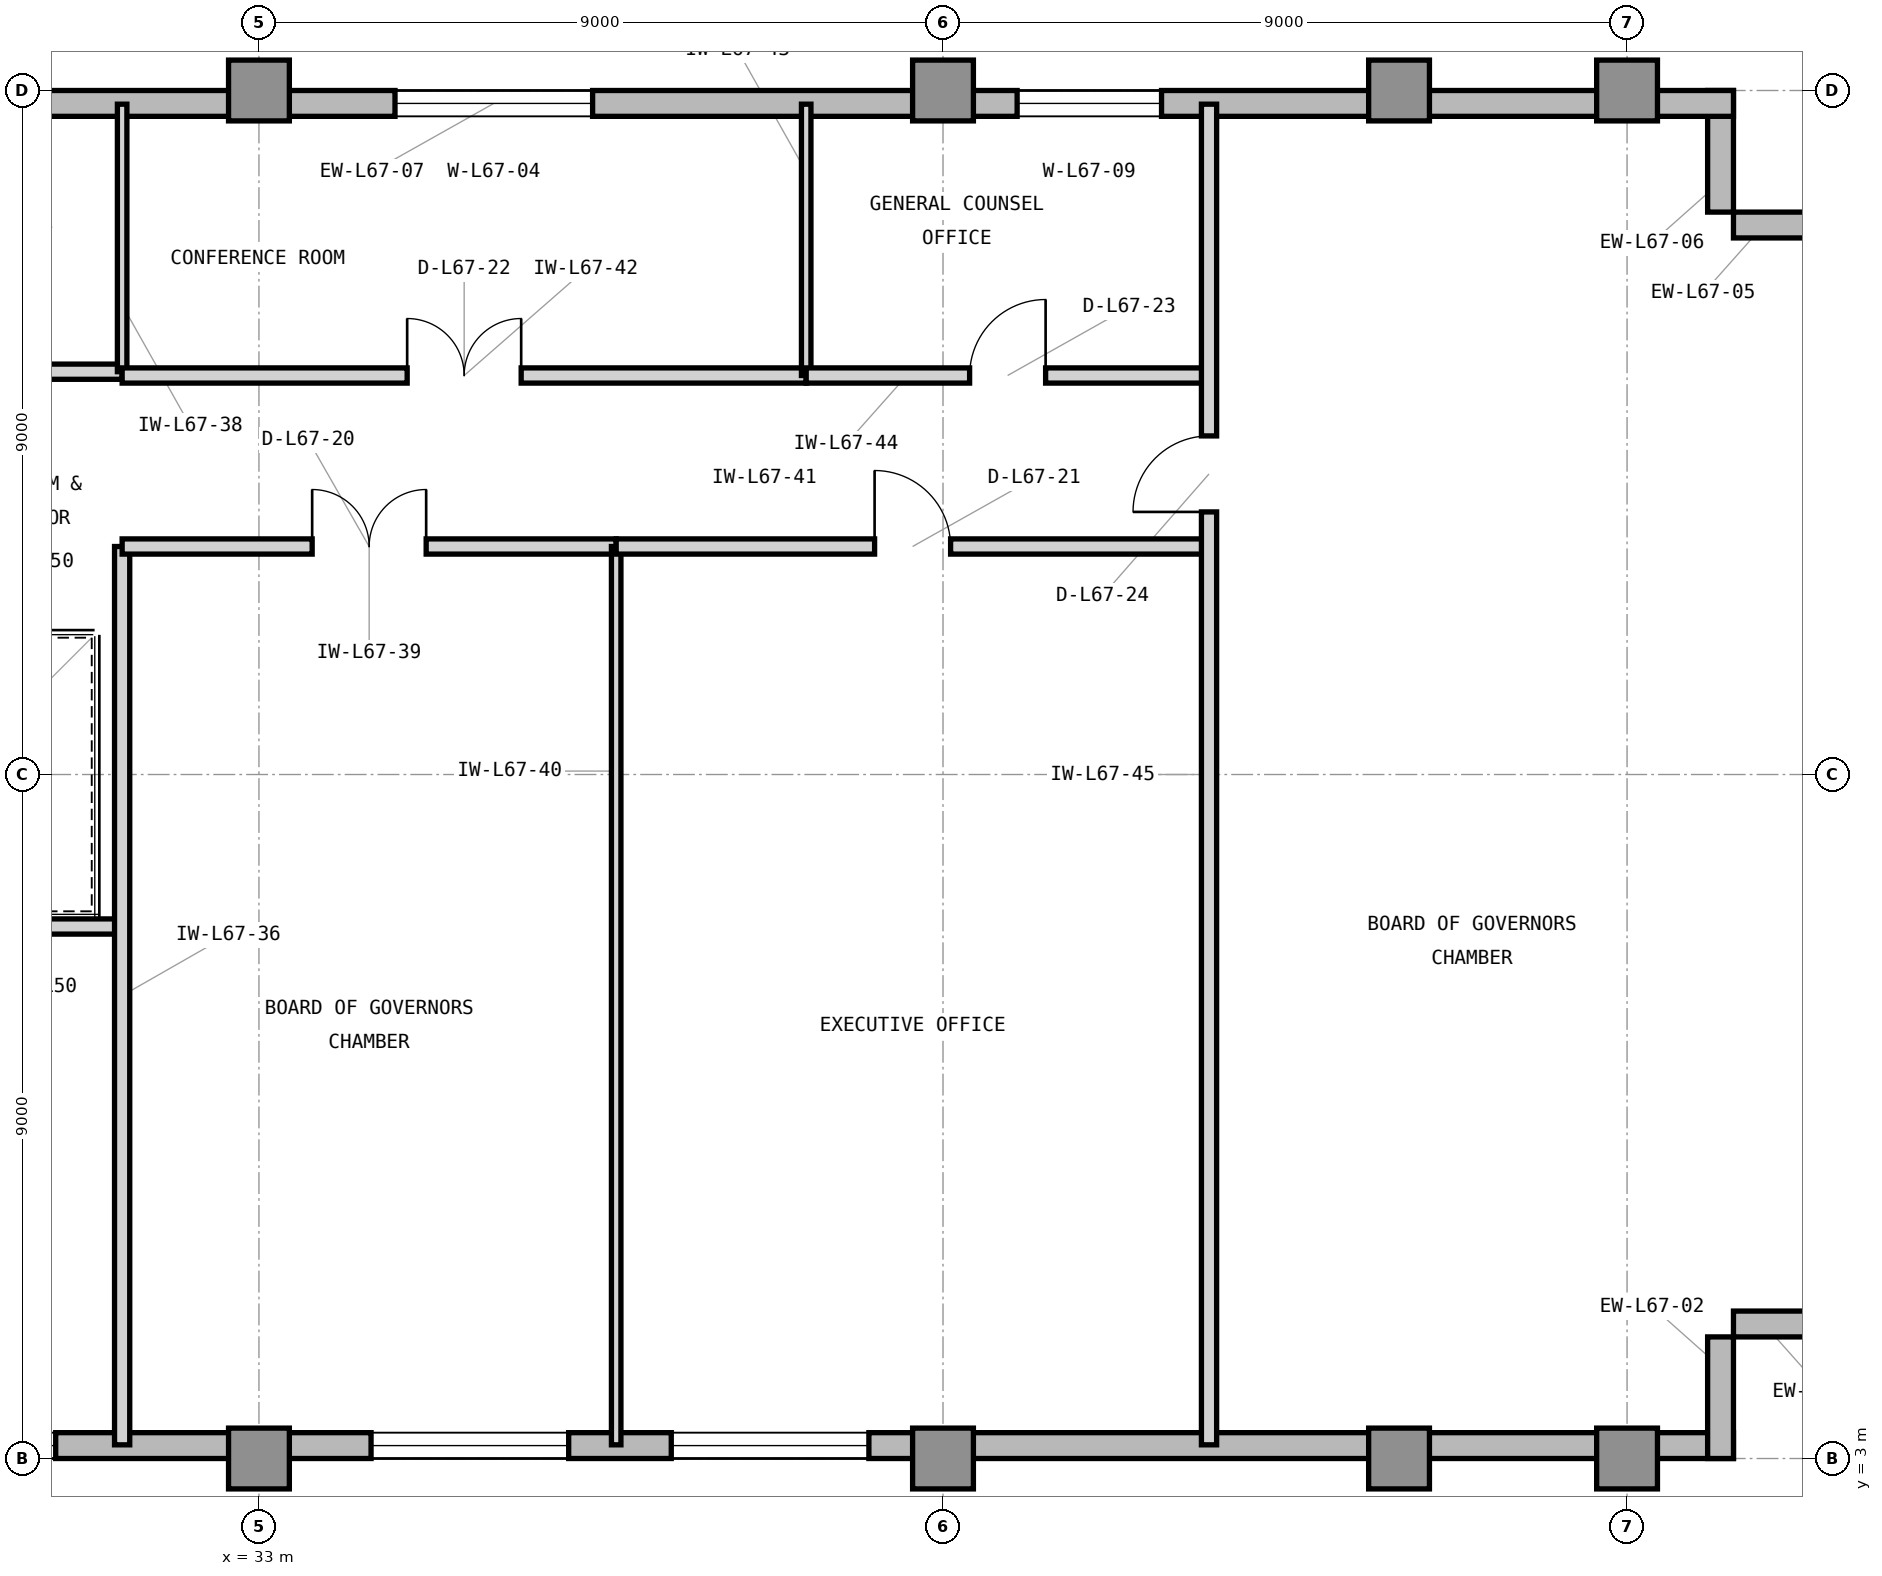
"""IFC4 building model, lengths in metres.
Left out: names, types, materials, properties, quantities, classifications, styles, units other than length and angle.
Written with IfcOpenShell. Run it as: python <this file> out.ifc"""

import sys

from ifc_helpers import new_model, si_unit, direction, frame, frame_2d, origin, origin_2d, place, context, subcontext, project, spatial, rectangle, extrude, element, fill, save


model = new_model("IFC4")
c1 = context("Model", 3, precision=1e-05, world=origin(), true_north=direction((0.0, 1.0)))
c2 = subcontext(c1, "Body", "Model", "MODEL_VIEW")
j1 = project(units=[si_unit("LENGTHUNIT", "METRE"), si_unit("PLANEANGLEUNIT", "RADIAN")], contexts=[c1])
p1 = place(None, origin())
s1 = spatial("IfcSite", under=j1, at=p1, CompositionType="ELEMENT")
p2 = place(p1, origin())
s2 = spatial("IfcBuilding", under=s1, at=p2, CompositionType="ELEMENT")
p3 = place(p2, frame((0.0, 0.0, 274.2)))
s3 = spatial("IfcBuildingStorey", under=s2, at=p3, CompositionType="ELEMENT", Elevation=274.2)
for number, where, z_axis, x_axis in (
    (1, (33.0, 3.0, 0.0), (0.0, 0.0, 1.0), (1.0, 0.0, 0.0)),
    (2, (33.0, 21.0, 0.0), (0.0, 0.0, 1.0), (1.0, 0.0, 0.0)),
    (3, (42.0, 3.0, 0.0), (0.0, 0.0, 1.0), (1.0, 0.0, 0.0)),
    (4, (42.0, 21.0, 0.0), (0.0, 0.0, 1.0), (1.0, 0.0, 0.0)),
    (5, (48.0, 3.0, 0.0), (0.0, 0.0, 1.0), (1.0, 0.0, 0.0)),
    (6, (48.0, 21.0, 0.0), (0.0, 0.0, 1.0), (1.0, 0.0, 0.0)),
    (7, (51.0, 3.0, 0.0), (0.0, 0.0, 1.0), (1.0, 0.0, 0.0)),
    (8, (51.0, 21.0, 0.0), (0.0, 0.0, 1.0), (1.0, 0.0, 0.0)),
):
    element("IfcColumn", number, at=place(p3, frame(where, z_axis=z_axis, x_axis=x_axis)), inside=s3, PredefinedType="COLUMN", context=c2, shape_type="SweptSolid", body=[
        extrude(rectangle(XDim=0.8, YDim=0.8, at=origin_2d()), origin(), (0.0, 0.0, 1.0), 3.9),
    ])
p4 = place(p3, frame((23.9, 3.17, 0.0), z_axis=(0.0, 0.0, 1.0), x_axis=(1.0, 0.0, 0.0)))
e9 = element("IfcWall", 9, at=p4, inside=s3, PredefinedType="STANDARD", context=c2, shape_type="SweptSolid", body=[
    extrude(rectangle(XDim=28.5, YDim=0.34, at=frame_2d((14.25, 0.0))), origin(), (0.0, 0.0, 1.0), 3.715),
])
p5 = place(p4, frame((10.575, 0.0, 0.8)))
e10 = element("IfcOpeningElement", 10, at=p5, cuts=e9, PredefinedType="OPENING", context=c2, shape_type="SweptSolid", body=[
    extrude(rectangle(XDim=2.6, YDim=2.35, at=frame_2d((1.3, 1.175))), frame((0.0, 0.18, 0.0), z_axis=(0.0, -1.0, 0.0), x_axis=(1.0, 0.0, 0.0)), (0.0, 0.0, 1.0), 0.36),
])
p6 = place(p4, frame((1.1, 0.0, 0.8)))
e11 = element("IfcOpeningElement", 11, at=p6, cuts=e9, PredefinedType="OPENING", context=c2, shape_type="SweptSolid", body=[
    extrude(rectangle(XDim=1.2, YDim=2.35, at=frame_2d((0.6, 1.175))), frame((0.0, 0.18, 0.0), z_axis=(0.0, -1.0, 0.0), x_axis=(1.0, 0.0, 0.0)), (0.0, 0.0, 1.0), 0.36),
])
p7 = place(p4, frame((3.826, 0.0, 0.8)))
e12 = element("IfcOpeningElement", 12, at=p7, cuts=e9, PredefinedType="OPENING", context=c2, shape_type="SweptSolid", body=[
    extrude(rectangle(XDim=2.6, YDim=2.35, at=frame_2d((1.3, 1.175))), frame((0.0, 0.18, 0.0), z_axis=(0.0, -1.0, 0.0), x_axis=(1.0, 0.0, 0.0)), (0.0, 0.0, 1.0), 0.36),
])
p8 = place(p4, frame((14.525, 0.0, 0.8)))
e13 = element("IfcOpeningElement", 13, at=p8, cuts=e9, PredefinedType="OPENING", context=c2, shape_type="SweptSolid", body=[
    extrude(rectangle(XDim=2.6, YDim=2.35, at=frame_2d((1.3, 1.175))), frame((0.0, 0.18, 0.0), z_axis=(0.0, -1.0, 0.0), x_axis=(1.0, 0.0, 0.0)), (0.0, 0.0, 1.0), 0.36),
])
for number, where, z_axis, x_axis in (
    (14, (52.23, 3.0, 0.0), (0.0, 0.0, 1.0), (0.0, 1.0, 0.0)),
    (15, (52.4, 4.77, 0.0), (0.0, 0.0, 1.0), (1.0, 0.0, 0.0)),
    (16, (54.0, 19.23, 0.0), (0.0, 0.0, 1.0), (-1.0, 0.0, 0.0)),
    (17, (52.23, 19.4, 0.0), (0.0, 0.0, 1.0), (0.0, 1.0, 0.0)),
):
    element("IfcWall", number, at=place(p3, frame(where, z_axis=z_axis, x_axis=x_axis)), inside=s3, PredefinedType="STANDARD", context=c2, shape_type="SweptSolid", body=[
        extrude(rectangle(XDim=1.6, YDim=0.34, at=frame_2d((0.8, 0.0))), origin(), (0.0, 0.0, 1.0), 3.715),
    ])
p9 = place(p3, frame((52.4, 20.83, 0.0), z_axis=(0.0, 0.0, 1.0), x_axis=(-1.0, 0.0, 0.0)))
e18 = element("IfcWall", 18, at=p9, inside=s3, PredefinedType="STANDARD", context=c2, shape_type="SweptSolid", body=[
    extrude(rectangle(XDim=32.62, YDim=0.34, at=frame_2d((16.31, 0.0))), origin(), (0.0, 0.0, 1.0), 3.715),
])
p10 = place(p9, frame((15.01, 0.0, 0.8)))
e19 = element("IfcOpeningElement", 19, at=p10, cuts=e18, PredefinedType="OPENING", context=c2, shape_type="SweptSolid", body=[
    extrude(rectangle(XDim=2.6, YDim=2.35, at=frame_2d((1.3, 1.175))), frame((0.0, 0.18, 0.0), z_axis=(0.0, -1.0, 0.0), x_axis=(1.0, 0.0, 0.0)), (0.0, 0.0, 1.0), 0.36),
])
p11 = place(p9, frame((24.33, 0.0, 0.8)))
e20 = element("IfcOpeningElement", 20, at=p11, cuts=e18, PredefinedType="OPENING", context=c2, shape_type="SweptSolid", body=[
    extrude(rectangle(XDim=2.6, YDim=2.35, at=frame_2d((1.3, 1.175))), frame((0.0, 0.18, 0.0), z_axis=(0.0, -1.0, 0.0), x_axis=(1.0, 0.0, 0.0)), (0.0, 0.0, 1.0), 0.36),
])
p12 = place(p9, frame((7.525, 0.0, 0.8)))
e21 = element("IfcOpeningElement", 21, at=p12, cuts=e18, PredefinedType="OPENING", context=c2, shape_type="SweptSolid", body=[
    extrude(rectangle(XDim=1.9, YDim=2.35, at=frame_2d((0.95, 1.175))), frame((0.0, 0.18, 0.0), z_axis=(0.0, -1.0, 0.0), x_axis=(1.0, 0.0, 0.0)), (0.0, 0.0, 1.0), 0.36),
])
p13 = place(p3, frame((26.9, 10.0, 0.0), z_axis=(0.0, 0.0, 1.0), x_axis=(1.0, 0.0, 0.0)))
e22 = element("IfcWall", 22, at=p13, inside=s3, PredefinedType="PARTITIONING", context=c2, shape_type="SweptSolid", body=[
    extrude(rectangle(XDim=4.3, YDim=0.2, at=frame_2d((2.15, 0.0))), origin(), (0.0, 0.0, 1.0), 3.705),
])
p14 = place(p3, frame((31.2, 3.18, 0.0), z_axis=(0.0, 0.0, 1.0), x_axis=(0.0, 1.0, 0.0)))
e23 = element("IfcWall", 23, at=p14, inside=s3, PredefinedType="PARTITIONING", context=c2, shape_type="SweptSolid", body=[
    extrude(rectangle(XDim=11.82, YDim=0.2, at=frame_2d((5.91, 0.0))), origin(), (0.0, 0.0, 1.0), 3.705),
])
p15 = place(p3, frame((23.85, 17.3, 0.0), z_axis=(0.0, 0.0, 1.0), x_axis=(1.0, 0.0, 0.0)))
e24 = element("IfcWall", 24, at=p15, inside=s3, PredefinedType="PARTITIONING", context=c2, shape_type="SweptSolid", body=[
    extrude(rectangle(XDim=7.35, YDim=0.2, at=frame_2d((3.675, 0.0))), origin(), (0.0, 0.0, 1.0), 3.705),
])
p16 = place(p15, frame((2.8, 0.0, 0.0)))
e25 = element("IfcOpeningElement", 25, at=p16, cuts=e24, PredefinedType="OPENING", context=c2, shape_type="SweptSolid", body=[
    extrude(rectangle(XDim=1.0, YDim=2.15, at=frame_2d((0.5, 1.075))), frame((0.0, 0.11, 0.0), z_axis=(0.0, -1.0, 0.0), x_axis=(1.0, 0.0, 0.0)), (0.0, 0.0, 1.0), 0.22),
])
p17 = place(p3, frame((31.2, 17.3, 0.0), z_axis=(0.0, 0.0, 1.0), x_axis=(0.0, 1.0, 0.0)))
e26 = element("IfcWall", 26, at=p17, inside=s3, PredefinedType="PARTITIONING", context=c2, shape_type="SweptSolid", body=[
    extrude(rectangle(XDim=3.52, YDim=0.125, at=frame_2d((1.76, 0.0))), origin(), (0.0, 0.0, 1.0), 3.705),
])
p18 = place(p3, frame((31.2, 15.0, 0.0), z_axis=(0.0, 0.0, 1.0), x_axis=(1.0, 0.0, 0.0)))
e27 = element("IfcWall", 27, at=p18, inside=s3, PredefinedType="PARTITIONING", context=c2, shape_type="SweptSolid", body=[
    extrude(rectangle(XDim=6.5, YDim=0.2, at=frame_2d((3.25, 0.0))), origin(), (0.0, 0.0, 1.0), 3.301),
])
p19 = place(p18, frame((2.5, 0.0, 0.0)))
e28 = element("IfcOpeningElement", 28, at=p19, cuts=e27, PredefinedType="OPENING", context=c2, shape_type="SweptSolid", body=[
    extrude(rectangle(XDim=1.5, YDim=2.3, at=frame_2d((0.75, 1.15))), frame((0.0, 0.11, 0.0), z_axis=(0.0, -1.0, 0.0), x_axis=(1.0, 0.0, 0.0)), (0.0, 0.0, 1.0), 0.22),
])
p20 = place(p3, frame((37.7, 3.18, 0.0), z_axis=(0.0, 0.0, 1.0), x_axis=(0.0, 1.0, 0.0)))
e29 = element("IfcWall", 29, at=p20, inside=s3, PredefinedType="PARTITIONING", context=c2, shape_type="SweptSolid", body=[
    extrude(rectangle(XDim=11.82, YDim=0.125, at=frame_2d((5.91, 0.0))), origin(), (0.0, 0.0, 1.0), 3.705),
])
p21 = place(p3, frame((37.7, 15.0, 0.0), z_axis=(0.0, 0.0, 1.0), x_axis=(1.0, 0.0, 0.0)))
e30 = element("IfcWall", 30, at=p21, inside=s3, PredefinedType="PARTITIONING", context=c2, shape_type="SweptSolid", body=[
    extrude(rectangle(XDim=7.8, YDim=0.2, at=frame_2d((3.9, 0.0))), origin(), (0.0, 0.0, 1.0), 3.301),
])
p22 = place(p21, frame((3.4, 0.0, 0.0)))
e31 = element("IfcOpeningElement", 31, at=p22, cuts=e30, PredefinedType="OPENING", context=c2, shape_type="SweptSolid", body=[
    extrude(rectangle(XDim=1.0, YDim=2.15, at=frame_2d((0.5, 1.075))), frame((0.0, 0.11, 0.0), z_axis=(0.0, -1.0, 0.0), x_axis=(1.0, 0.0, 0.0)), (0.0, 0.0, 1.0), 0.22),
])
p23 = place(p3, frame((31.2, 17.25, 0.0), z_axis=(0.0, 0.0, 1.0), x_axis=(1.0, 0.0, 0.0)))
e32 = element("IfcWall", 32, at=p23, inside=s3, PredefinedType="PARTITIONING", context=c2, shape_type="SweptSolid", body=[
    extrude(rectangle(XDim=9.0, YDim=0.2, at=frame_2d((4.5, 0.0))), origin(), (0.0, 0.0, 1.0), 3.705),
])
p24 = place(p23, frame((3.75, 0.0, 0.0)))
e33 = element("IfcOpeningElement", 33, at=p24, cuts=e32, PredefinedType="OPENING", context=c2, shape_type="SweptSolid", body=[
    extrude(rectangle(XDim=1.5, YDim=2.3, at=frame_2d((0.75, 1.15))), frame((0.0, 0.11, 0.0), z_axis=(0.0, -1.0, 0.0), x_axis=(1.0, 0.0, 0.0)), (0.0, 0.0, 1.0), 0.22),
])
p25 = place(p3, frame((40.2, 17.25, 0.0), z_axis=(0.0, 0.0, 1.0), x_axis=(0.0, 1.0, 0.0)))
e34 = element("IfcWall", 34, at=p25, inside=s3, PredefinedType="PARTITIONING", context=c2, shape_type="SweptSolid", body=[
    extrude(rectangle(XDim=3.57, YDim=0.125, at=frame_2d((1.785, 0.0))), origin(), (0.0, 0.0, 1.0), 3.705),
])
p26 = place(p3, frame((40.2, 17.25, 0.0), z_axis=(0.0, 0.0, 1.0), x_axis=(1.0, 0.0, 0.0)))
e35 = element("IfcWall", 35, at=p26, inside=s3, PredefinedType="PARTITIONING", context=c2, shape_type="SweptSolid", body=[
    extrude(rectangle(XDim=5.3, YDim=0.2, at=frame_2d((2.65, 0.0))), origin(), (0.0, 0.0, 1.0), 3.705),
])
p27 = place(p26, frame((2.15, 0.0, 0.0)))
e36 = element("IfcOpeningElement", 36, at=p27, cuts=e35, PredefinedType="OPENING", context=c2, shape_type="SweptSolid", body=[
    extrude(rectangle(XDim=1.0, YDim=2.15, at=frame_2d((0.5, 1.075))), frame((0.0, 0.11, 0.0), z_axis=(0.0, -1.0, 0.0), x_axis=(1.0, 0.0, 0.0)), (0.0, 0.0, 1.0), 0.22),
])
p28 = place(p3, frame((45.5, 3.18, 0.0), z_axis=(0.0, 0.0, 1.0), x_axis=(0.0, 1.0, 0.0)))
e37 = element("IfcWall", 37, at=p28, inside=s3, PredefinedType="PARTITIONING", context=c2, shape_type="SweptSolid", body=[
    extrude(rectangle(XDim=17.64, YDim=0.2, at=frame_2d((8.82, 0.0))), origin(), (0.0, 0.0, 1.0), 3.705),
])
p29 = place(p28, frame((12.275, 0.0, 0.0)))
e38 = element("IfcOpeningElement", 38, at=p29, cuts=e37, PredefinedType="OPENING", context=c2, shape_type="SweptSolid", body=[
    extrude(rectangle(XDim=1.0, YDim=2.15, at=frame_2d((0.5, 1.075))), frame((0.0, 0.11, 0.0), z_axis=(0.0, -1.0, 0.0), x_axis=(1.0, 0.0, 0.0)), (0.0, 0.0, 1.0), 0.22),
])
p30 = place(p5, origin())
e39 = element("IfcWindow", 39, at=p30, inside=s3, PartitioningType="SINGLE_PANEL", PredefinedType="WINDOW", context=c2, shape_type="SweptSolid", body=[
    extrude(rectangle(XDim=2.6, YDim=2.35, at=frame_2d((1.3, 1.175))), frame((0.0, 0.11, 0.0), z_axis=(0.0, -1.0, 0.0), x_axis=(1.0, 0.0, 0.0)), (0.0, 0.0, 1.0), 0.06),
])
fill(e10, e39)
p31 = place(p10, origin())
e40 = element("IfcWindow", 40, at=p31, inside=s3, PartitioningType="SINGLE_PANEL", PredefinedType="WINDOW", context=c2, shape_type="SweptSolid", body=[
    extrude(rectangle(XDim=2.6, YDim=2.35, at=frame_2d((1.3, 1.175))), frame((0.0, 0.11, 0.0), z_axis=(0.0, -1.0, 0.0), x_axis=(1.0, 0.0, 0.0)), (0.0, 0.0, 1.0), 0.06),
])
fill(e19, e40)
p32 = place(p19, origin())
e41 = element("IfcDoor", 41, at=p32, inside=s3, OperationType="DOUBLE_DOOR_SINGLE_SWING", PredefinedType="DOOR", context=c2, shape_type="SweptSolid", body=[
    extrude(rectangle(XDim=1.5, YDim=2.3, at=frame_2d((0.75, 1.15))), frame((0.0, 0.025, 0.0), z_axis=(0.0, -1.0, 0.0), x_axis=(1.0, 0.0, 0.0)), (0.0, 0.0, 1.0), 0.05),
])
fill(e28, e41)
p33 = place(p22, origin())
e42 = element("IfcDoor", 42, at=p33, inside=s3, OperationType="SINGLE_SWING_LEFT", PredefinedType="DOOR", context=c2, shape_type="SweptSolid", body=[
    extrude(rectangle(XDim=1.0, YDim=2.15, at=frame_2d((0.5, 1.075))), frame((0.0, 0.025, 0.0), z_axis=(0.0, -1.0, 0.0), x_axis=(1.0, 0.0, 0.0)), (0.0, 0.0, 1.0), 0.05),
])
fill(e31, e42)
p34 = place(p24, origin())
e43 = element("IfcDoor", 43, at=p34, inside=s3, OperationType="DOUBLE_DOOR_SINGLE_SWING", PredefinedType="DOOR", context=c2, shape_type="SweptSolid", body=[
    extrude(rectangle(XDim=1.5, YDim=2.3, at=frame_2d((0.75, 1.15))), frame((0.0, 0.025, 0.0), z_axis=(0.0, -1.0, 0.0), x_axis=(1.0, 0.0, 0.0)), (0.0, 0.0, 1.0), 0.05),
])
fill(e33, e43)
p35 = place(p27, origin())
e44 = element("IfcDoor", 44, at=p35, inside=s3, OperationType="SINGLE_SWING_RIGHT", PredefinedType="DOOR", context=c2, shape_type="SweptSolid", body=[
    extrude(rectangle(XDim=1.0, YDim=2.15, at=frame_2d((0.5, 1.075))), frame((0.0, 0.025, 0.0), z_axis=(0.0, -1.0, 0.0), x_axis=(1.0, 0.0, 0.0)), (0.0, 0.0, 1.0), 0.05),
])
fill(e36, e44)
p36 = place(p29, origin())
e45 = element("IfcDoor", 45, at=p36, inside=s3, OperationType="SINGLE_SWING_LEFT", PredefinedType="DOOR", context=c2, shape_type="SweptSolid", body=[
    extrude(rectangle(XDim=1.0, YDim=2.15, at=frame_2d((0.5, 1.075))), frame((0.0, 0.025, 0.0), z_axis=(0.0, -1.0, 0.0), x_axis=(1.0, 0.0, 0.0)), (0.0, 0.0, 1.0), 0.05),
])
fill(e38, e45)
p37 = place(p7, origin())
e46 = element("IfcWindow", 46, at=p37, inside=s3, PartitioningType="SINGLE_PANEL", PredefinedType="WINDOW", context=c2, shape_type="SweptSolid", body=[
    extrude(rectangle(XDim=2.6, YDim=2.35, at=frame_2d((1.3, 1.175))), frame((0.0, 0.11, 0.0), z_axis=(0.0, -1.0, 0.0), x_axis=(1.0, 0.0, 0.0)), (0.0, 0.0, 1.0), 0.06),
])
fill(e12, e46)
p38 = place(p8, origin())
e47 = element("IfcWindow", 47, at=p38, inside=s3, PartitioningType="SINGLE_PANEL", PredefinedType="WINDOW", context=c2, shape_type="SweptSolid", body=[
    extrude(rectangle(XDim=2.6, YDim=2.35, at=frame_2d((1.3, 1.175))), frame((0.0, 0.11, 0.0), z_axis=(0.0, -1.0, 0.0), x_axis=(1.0, 0.0, 0.0)), (0.0, 0.0, 1.0), 0.06),
])
fill(e13, e47)
p39 = place(p12, origin())
e48 = element("IfcWindow", 48, at=p39, inside=s3, PartitioningType="SINGLE_PANEL", PredefinedType="WINDOW", context=c2, shape_type="SweptSolid", body=[
    extrude(rectangle(XDim=1.9, YDim=2.35, at=frame_2d((0.95, 1.175))), frame((0.0, 0.11, 0.0), z_axis=(0.0, -1.0, 0.0), x_axis=(1.0, 0.0, 0.0)), (0.0, 0.0, 1.0), 0.06),
])
fill(e21, e48)
save(model, sys.argv[1])
